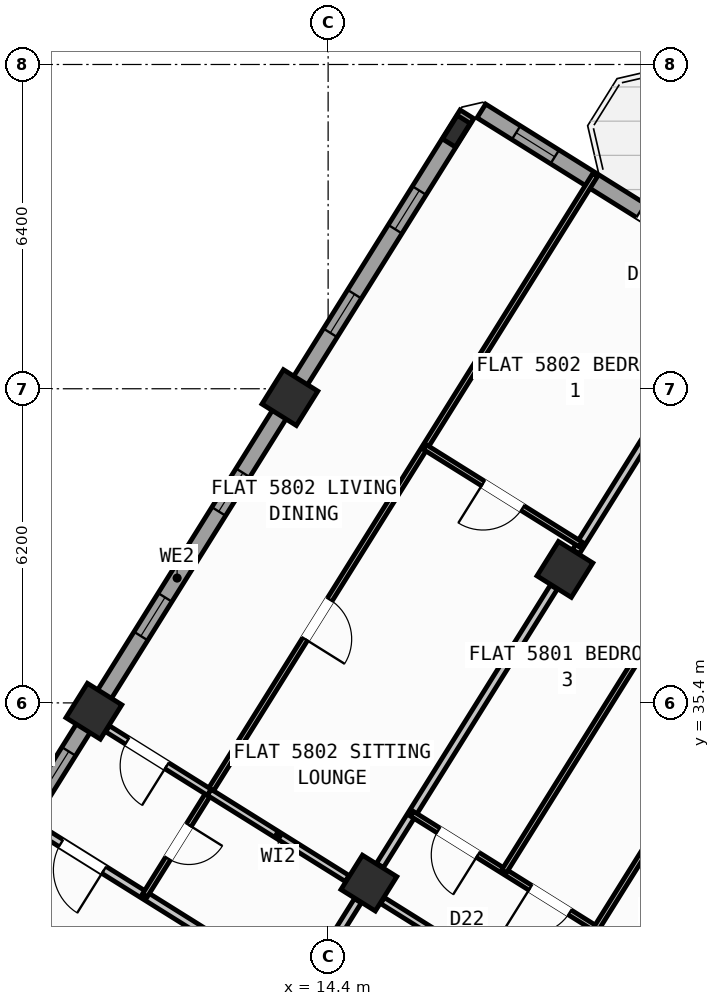
"""IFC4 building model, lengths in metres.
Left out: names, types, materials, properties, quantities, classifications, styles, units other than length and angle.
Written with IfcOpenShell. Run it as: python <this file> out.ifc"""

import sys

from ifc_helpers import new_model, si_unit, direction, frame, frame_2d, origin, origin_2d, place, context, subcontext, project, spatial, rectangle, hollow_rectangle, i_section, extrude, source, transform, mapped, element, fill, save


model = new_model("IFC4")
c1 = context("Model", 3, precision=1e-05, world=origin(), true_north=direction((0.0, 1.0)))
c2 = subcontext(c1, "Body", "Model", "MODEL_VIEW")
j1 = project(units=[si_unit("LENGTHUNIT", "METRE"), si_unit("PLANEANGLEUNIT", "RADIAN")], contexts=[c1])
p1 = place(None, origin())
s1 = spatial("IfcSite", under=j1, at=p1, CompositionType="ELEMENT")
p2 = place(p1, origin())
s2 = spatial("IfcBuilding", under=s1, at=p2, CompositionType="ELEMENT")
p3 = place(p2, frame((0.0, 0.0, 229.2)))
s3 = spatial("IfcBuildingStorey", under=s2, at=p3, CompositionType="ELEMENT", Elevation=229.2)
m1 = source(origin(), c2, "Body", "SweptSolid", [
    extrude(hollow_rectangle(XDim=0.8, YDim=0.8, WallThickness=0.032, at=origin_2d()), origin(), (0.0, 0.0, 1.0), 4.5),
])
for number, where, z_axis, x_axis in (
    (1, (19.073, 38.034, 0.0), (0.0, 0.0, 1.0), (-0.848, 0.53, 0.0)),
    (2, (15.205, 31.844, 0.0), (0.0, 0.0, 1.0), (-0.848, 0.53, 0.0)),
):
    element("IfcColumn", number, at=place(p3, frame(where, z_axis=z_axis, x_axis=x_axis)), inside=s3, PredefinedType="COLUMN", context=c2, shape_type="MappedRepresentation", body=[
        mapped(m1, transform((0.0, 0.0, 0.0), scale=1.0)),
    ])
m2 = source(origin(), c2, "Body", "SweptSolid", [
    extrude(i_section(OverallWidth=0.3, OverallDepth=0.55, WebThickness=0.015, FlangeThickness=0.029, at=origin_2d()), origin(), (0.0, 0.0, 1.0), 4.5),
])
p4 = place(p3, frame((16.931, 46.684, 0.0), z_axis=(0.0, 0.0, 1.0), x_axis=(-0.848048096156, 0.529919264233, 0.0)))
e3 = element("IfcColumn", 3, at=p4, inside=s3, PredefinedType="COLUMN", context=c2, shape_type="MappedRepresentation", body=[
    mapped(m2, transform((0.0, 0.0, 0.0), scale=1.0)),
])
for number, where, z_axis, x_axis in (
    (4, (13.646, 41.426, 0.0), (0.0, 0.0, 1.0), (-0.848, 0.53, 0.0)),
    (5, (9.777, 35.235, 0.0), (0.0, 0.0, 1.0), (-0.848, 0.53, 0.0)),
):
    element("IfcColumn", number, at=place(p3, frame(where, z_axis=z_axis, x_axis=x_axis)), inside=s3, PredefinedType="COLUMN", context=c2, shape_type="MappedRepresentation", body=[
        mapped(m1, transform((0.0, 0.0, 0.0), scale=1.0)),
    ])
p5 = place(p3, frame((5.7, 28.71, 0.0), z_axis=(0.0, 0.0, 1.0), x_axis=(0.529923711467, 0.8480453172, 0.0)))
e6 = element("IfcWall", 6, at=p5, inside=s3, PredefinedType="STANDARD", context=c2, shape_type="SweptSolid", body=[
    extrude(rectangle(XDim=21.587, YDim=0.32, at=frame_2d((10.794, 0.0))), origin(), (0.0, 0.0, 1.0), 2.395),
])
p6 = place(p5, frame((5.859, 0.0, 1.0)))
e7 = element("IfcOpeningElement", 7, at=p6, cuts=e6, PredefinedType="OPENING", context=c2, shape_type="SweptSolid", body=[
    extrude(rectangle(XDim=0.9, YDim=1.25, at=frame_2d((0.45, 0.625))), frame((0.0, 0.17, 0.0), z_axis=(0.0, -1.0, 0.0), x_axis=(1.0, 0.0, 0.0)), (0.0, 0.0, 1.0), 0.34),
])
p7 = place(p5, frame((9.444, 0.0, 1.0)))
e8 = element("IfcOpeningElement", 8, at=p7, cuts=e6, PredefinedType="OPENING", context=c2, shape_type="SweptSolid", body=[
    extrude(rectangle(XDim=0.9, YDim=1.25, at=frame_2d((0.45, 0.625))), frame((0.0, 0.17, 0.0), z_axis=(0.0, -1.0, 0.0), x_axis=(1.0, 0.0, 0.0)), (0.0, 0.0, 1.0), 0.34),
])
p8 = place(p5, frame((12.344, 0.0, 1.0)))
e9 = element("IfcOpeningElement", 9, at=p8, cuts=e6, PredefinedType="OPENING", context=c2, shape_type="SweptSolid", body=[
    extrude(rectangle(XDim=0.9, YDim=1.25, at=frame_2d((0.45, 0.625))), frame((0.0, 0.17, 0.0), z_axis=(0.0, -1.0, 0.0), x_axis=(1.0, 0.0, 0.0)), (0.0, 0.0, 1.0), 0.34),
])
p9 = place(p5, frame((16.5, 0.0, 1.0)))
e10 = element("IfcOpeningElement", 10, at=p9, cuts=e6, PredefinedType="OPENING", context=c2, shape_type="SweptSolid", body=[
    extrude(rectangle(XDim=0.9, YDim=1.25, at=frame_2d((0.45, 0.625))), frame((0.0, 0.17, 0.0), z_axis=(0.0, -1.0, 0.0), x_axis=(1.0, 0.0, 0.0)), (0.0, 0.0, 1.0), 0.34),
])
p10 = place(p5, frame((18.913, 0.0, 1.0)))
e11 = element("IfcOpeningElement", 11, at=p10, cuts=e6, PredefinedType="OPENING", context=c2, shape_type="SweptSolid", body=[
    extrude(rectangle(XDim=0.9, YDim=1.25, at=frame_2d((0.45, 0.625))), frame((0.0, 0.17, 0.0), z_axis=(0.0, -1.0, 0.0), x_axis=(1.0, 0.0, 0.0)), (0.0, 0.0, 1.0), 0.34),
])
p11 = place(p3, frame((17.424, 47.083, 0.0), z_axis=(0.0, 0.0, 1.0), x_axis=(0.848049927979, -0.529916332693, 0.0)))
e12 = element("IfcWall", 12, at=p11, inside=s3, PredefinedType="STANDARD", context=c2, shape_type="SweptSolid", body=[
    extrude(rectangle(XDim=29.223, YDim=0.32, at=frame_2d((14.612, 0.0))), origin(), (0.0, 0.0, 1.0), 4.22),
])
p12 = place(p11, frame((3.709, 0.0, 0.0)))
e13 = element("IfcOpeningElement", 13, at=p12, cuts=e12, PredefinedType="OPENING", context=c2, shape_type="SweptSolid", body=[
    extrude(rectangle(XDim=1.05, YDim=2.15, at=frame_2d((0.525, 1.075))), frame((0.0, 0.17, 0.0), z_axis=(0.0, -1.0, 0.0), x_axis=(1.0, 0.0, 0.0)), (0.0, 0.0, 1.0), 0.34),
])
p13 = place(p11, frame((0.809, 0.0, 1.0)))
e14 = element("IfcOpeningElement", 14, at=p13, cuts=e12, PredefinedType="OPENING", context=c2, shape_type="SweptSolid", body=[
    extrude(rectangle(XDim=0.9, YDim=1.25, at=frame_2d((0.45, 0.625))), frame((0.0, 0.17, 0.0), z_axis=(0.0, -1.0, 0.0), x_axis=(1.0, 0.0, 0.0)), (0.0, 0.0, 1.0), 0.34),
])
p14 = place(p11, frame((13.811, 0.0, 0.9)))
e15 = element("IfcOpeningElement", 15, at=p14, cuts=e12, PredefinedType="OPENING", context=c2, shape_type="SweptSolid", body=[
    extrude(rectangle(XDim=1.35, YDim=1.45, at=frame_2d((0.675, 0.725))), frame((0.0, 0.17, 0.0), z_axis=(0.0, -1.0, 0.0), x_axis=(1.0, 0.0, 0.0)), (0.0, 0.0, 1.0), 0.34),
])
p15 = place(p11, frame((17.254, 0.0, 1.0)))
e16 = element("IfcOpeningElement", 16, at=p15, cuts=e12, PredefinedType="OPENING", context=c2, shape_type="SweptSolid", body=[
    extrude(rectangle(XDim=0.9, YDim=1.25, at=frame_2d((0.45, 0.625))), frame((0.0, 0.17, 0.0), z_axis=(0.0, -1.0, 0.0), x_axis=(1.0, 0.0, 0.0)), (0.0, 0.0, 1.0), 0.34),
])
p16 = place(p11, frame((21.364, 0.0, 1.0)))
e17 = element("IfcOpeningElement", 17, at=p16, cuts=e12, PredefinedType="OPENING", context=c2, shape_type="SweptSolid", body=[
    extrude(rectangle(XDim=0.9, YDim=1.25, at=frame_2d((0.45, 0.625))), frame((0.0, 0.17, 0.0), z_axis=(0.0, -1.0, 0.0), x_axis=(1.0, 0.0, 0.0)), (0.0, 0.0, 1.0), 0.34),
])
p17 = place(p11, frame((26.003, 0.0, 1.0)))
e18 = element("IfcOpeningElement", 18, at=p17, cuts=e12, PredefinedType="OPENING", context=c2, shape_type="SweptSolid", body=[
    extrude(rectangle(XDim=0.9, YDim=1.25, at=frame_2d((0.45, 0.625))), frame((0.0, 0.17, 0.0), z_axis=(0.0, -1.0, 0.0), x_axis=(1.0, 0.0, 0.0)), (0.0, 0.0, 1.0), 0.34),
])
p18 = place(p11, frame((11.211, 0.0, 1.0)))
e19 = element("IfcOpeningElement", 19, at=p18, cuts=e12, PredefinedType="OPENING", context=c2, shape_type="SweptSolid", body=[
    extrude(rectangle(XDim=0.65, YDim=1.15, at=frame_2d((0.325, 0.575))), frame((0.0, 0.17, 0.0), z_axis=(0.0, -1.0, 0.0), x_axis=(1.0, 0.0, 0.0)), (0.0, 0.0, 1.0), 0.34),
])
p19 = place(p11, frame((9.079, 0.0, 1.0)))
e20 = element("IfcOpeningElement", 20, at=p19, cuts=e12, PredefinedType="OPENING", context=c2, shape_type="SweptSolid", body=[
    extrude(rectangle(XDim=0.65, YDim=1.15, at=frame_2d((0.325, 0.575))), frame((0.0, 0.17, 0.0), z_axis=(0.0, -1.0, 0.0), x_axis=(1.0, 0.0, 0.0)), (0.0, 0.0, 1.0), 0.34),
])
p20 = place(p11, frame((6.951, 0.0, 1.0)))
e21 = element("IfcOpeningElement", 21, at=p20, cuts=e12, PredefinedType="OPENING", context=c2, shape_type="SweptSolid", body=[
    extrude(rectangle(XDim=0.65, YDim=1.15, at=frame_2d((0.325, 0.575))), frame((0.0, 0.17, 0.0), z_axis=(0.0, -1.0, 0.0), x_axis=(1.0, 0.0, 0.0)), (0.0, 0.0, 1.0), 0.34),
])
p21 = place(p3, frame((22.495, 24.281, 0.0), z_axis=(0.0, 0.0, 1.0), x_axis=(-0.848052408131, 0.529912363569, 0.0)))
e22 = element("IfcWall", 22, at=p21, inside=s3, PredefinedType="PARTITIONING", context=c2, shape_type="SweptSolid", body=[
    extrude(rectangle(XDim=16.73, YDim=0.16, at=frame_2d((8.365, 0.0))), origin(), (0.0, 0.0, 1.0), 4.21),
])
p22 = place(p21, frame((1.385, 0.0, 0.0)))
e23 = element("IfcOpeningElement", 23, at=p22, cuts=e22, PredefinedType="OPENING", context=c2, shape_type="SweptSolid", body=[
    extrude(rectangle(XDim=1.0, YDim=2.1, at=frame_2d((0.5, 1.05))), frame((0.0, 0.09, 0.0), z_axis=(0.0, -1.0, 0.0), x_axis=(1.0, 0.0, 0.0)), (0.0, 0.0, 1.0), 0.18),
])
p23 = place(p21, frame((14.76, 0.0, 0.0)))
e24 = element("IfcOpeningElement", 24, at=p23, cuts=e22, PredefinedType="OPENING", context=c2, shape_type="SweptSolid", body=[
    extrude(rectangle(XDim=1.0, YDim=2.1, at=frame_2d((0.5, 1.05))), frame((0.0, 0.09, 0.0), z_axis=(0.0, -1.0, 0.0), x_axis=(1.0, 0.0, 0.0)), (0.0, 0.0, 1.0), 0.18),
])
p24 = place(p3, frame((21.329, 22.416, 0.0), z_axis=(0.0, 0.0, 1.0), x_axis=(-0.848052408131, 0.529912363569, 0.0)))
e25 = element("IfcWall", 25, at=p24, inside=s3, PredefinedType="PARTITIONING", context=c2, shape_type="SweptSolid", body=[
    extrude(rectangle(XDim=16.73, YDim=0.16, at=frame_2d((8.365, 0.0))), origin(), (0.0, 0.0, 1.0), 4.21),
])
p25 = place(p24, frame((1.505, 0.0, 0.0)))
e26 = element("IfcOpeningElement", 26, at=p25, cuts=e25, PredefinedType="OPENING", context=c2, shape_type="SweptSolid", body=[
    extrude(rectangle(XDim=1.0, YDim=2.1, at=frame_2d((0.5, 1.05))), frame((0.0, 0.09, 0.0), z_axis=(0.0, -1.0, 0.0), x_axis=(1.0, 0.0, 0.0)), (0.0, 0.0, 1.0), 0.18),
])
p26 = place(p24, frame((6.435, 0.0, 0.0)))
e27 = element("IfcOpeningElement", 27, at=p26, cuts=e25, PredefinedType="OPENING", context=c2, shape_type="SweptSolid", body=[
    extrude(rectangle(XDim=1.0, YDim=2.1, at=frame_2d((0.5, 1.05))), frame((0.0, 0.09, 0.0), z_axis=(0.0, -1.0, 0.0), x_axis=(1.0, 0.0, 0.0)), (0.0, 0.0, 1.0), 0.18),
])
p27 = place(p24, frame((12.784, 0.0, 0.0)))
e28 = element("IfcOpeningElement", 28, at=p27, cuts=e25, PredefinedType="OPENING", context=c2, shape_type="SweptSolid", body=[
    extrude(rectangle(XDim=1.0, YDim=2.1, at=frame_2d((0.5, 1.05))), frame((0.0, 0.09, 0.0), z_axis=(0.0, -1.0, 0.0), x_axis=(1.0, 0.0, 0.0)), (0.0, 0.0, 1.0), 0.18),
])
p28 = place(p3, frame((22.206, 43.049, 0.0), z_axis=(0.0, 0.0, 1.0), x_axis=(-0.529919150083, -0.848048167486, 0.0)))
e29 = element("IfcWall", 29, at=p28, inside=s3, PredefinedType="PARTITIONING", context=c2, shape_type="SweptSolid", body=[
    extrude(rectangle(XDim=5.501, YDim=0.16, at=frame_2d((2.75, 0.0))), origin(), (0.0, 0.0, 1.0), 4.21),
])
p29 = place(p3, frame((18.854, 37.685, 0.0), z_axis=(0.0, 0.0, 1.0), x_axis=(-0.529907440938, -0.848055484057, 0.0)))
e30 = element("IfcWall", 30, at=p29, inside=s3, PredefinedType="PARTITIONING", context=c2, shape_type="SweptSolid", body=[
    extrude(rectangle(XDim=6.476, YDim=0.16, at=frame_2d((3.238, 0.0))), origin(), (0.0, 0.0, 1.0), 2.395),
])
p30 = place(p3, frame((14.986, 31.494, 0.0), z_axis=(0.0, 0.0, 1.0), x_axis=(-0.52989628283, -0.848062456098, 0.0)))
e31 = element("IfcWall", 31, at=p30, inside=s3, PredefinedType="PARTITIONING", context=c2, shape_type="SweptSolid", body=[
    extrude(rectangle(XDim=2.138, YDim=0.16, at=frame_2d((1.069, 0.0))), origin(), (0.0, 0.0, 1.0), 2.395),
])
p31 = place(p3, frame((20.203, 28.543, 0.0), z_axis=(0.0, 0.0, 1.0), x_axis=(-0.848049955116, 0.529916289265, 0.0)))
e32 = element("IfcWall", 32, at=p31, inside=s3, PredefinedType="PLUMBINGWALL", context=c2, shape_type="SweptSolid", body=[
    extrude(rectangle(XDim=5.576, YDim=0.14, at=frame_2d((2.788, 0.0))), origin(), (0.0, 0.0, 1.0), 3.745),
])
p32 = place(p31, frame((2.338, 0.0, 0.0)))
e33 = element("IfcOpeningElement", 33, at=p32, cuts=e32, PredefinedType="OPENING", context=c2, shape_type="SweptSolid", body=[
    extrude(rectangle(XDim=0.78, YDim=2.05, at=frame_2d((0.39, 1.025))), frame((0.0, 0.08, 0.0), z_axis=(0.0, -1.0, 0.0), x_axis=(1.0, 0.0, 0.0)), (0.0, 0.0, 1.0), 0.16),
])
p33 = place(p3, frame((21.502, 29.807, 0.0), z_axis=(0.0, 0.0, 1.0), x_axis=(-0.848051709137, 0.529913482212, 0.0)))
e34 = element("IfcWall", 34, at=p33, inside=s3, PredefinedType="PARTITIONING", context=c2, shape_type="SweptSolid", body=[
    extrude(rectangle(XDim=6.42, YDim=0.11, at=frame_2d((3.21, 0.0))), origin(), (0.0, 0.0, 1.0), 4.21),
])
p34 = place(p33, frame((0.61, 0.0, 0.0)))
e35 = element("IfcOpeningElement", 35, at=p34, cuts=e34, PredefinedType="OPENING", context=c2, shape_type="SweptSolid", body=[
    extrude(rectangle(XDim=0.92, YDim=2.08, at=frame_2d((0.46, 1.04))), frame((0.0, 0.065, 0.0), z_axis=(0.0, -1.0, 0.0), x_axis=(1.0, 0.0, 0.0)), (0.0, 0.0, 1.0), 0.13),
])
p35 = place(p33, frame((2.75, 0.0, 0.0)))
e36 = element("IfcOpeningElement", 36, at=p35, cuts=e34, PredefinedType="OPENING", context=c2, shape_type="SweptSolid", body=[
    extrude(rectangle(XDim=0.92, YDim=2.08, at=frame_2d((0.46, 1.04))), frame((0.0, 0.065, 0.0), z_axis=(0.0, -1.0, 0.0), x_axis=(1.0, 0.0, 0.0)), (0.0, 0.0, 1.0), 0.13),
])
p36 = place(p33, frame((4.89, 0.0, 0.0)))
e37 = element("IfcOpeningElement", 37, at=p36, cuts=e34, PredefinedType="OPENING", context=c2, shape_type="SweptSolid", body=[
    extrude(rectangle(XDim=0.92, YDim=2.08, at=frame_2d((0.46, 1.04))), frame((0.0, 0.065, 0.0), z_axis=(0.0, -1.0, 0.0), x_axis=(1.0, 0.0, 0.0)), (0.0, 0.0, 1.0), 0.13),
])
p37 = place(p3, frame((26.37, 41.635, 0.0), z_axis=(0.0, 0.0, 1.0), x_axis=(-0.529925845384, -0.848043983761, 0.0)))
e38 = element("IfcWall", 38, at=p37, inside=s3, PredefinedType="PARTITIONING", context=c2, shape_type="SweptSolid", body=[
    extrude(rectangle(XDim=12.61, YDim=0.11, at=frame_2d((6.305, 0.0))), origin(), (0.0, 0.0, 1.0), 3.895),
])
p38 = place(p3, frame((24.555, 42.769, 0.0), z_axis=(0.0, 0.0, 1.0), x_axis=(-0.529911921261, -0.848052684511, 0.0)))
e39 = element("IfcWall", 39, at=p38, inside=s3, PredefinedType="PARTITIONING", context=c2, shape_type="SweptSolid", body=[
    extrude(rectangle(XDim=12.61, YDim=0.11, at=frame_2d((6.305, 0.0))), origin(), (0.0, 0.0, 1.0), 3.895),
])
p39 = place(p3, frame((19.67, 45.821, 0.0), z_axis=(0.0, 0.0, 1.0), x_axis=(-0.529920421309, -0.848047373134, 0.0)))
e40 = element("IfcWall", 40, at=p39, inside=s3, PredefinedType="PARTITIONING", context=c2, shape_type="SweptSolid", body=[
    extrude(rectangle(XDim=16.77, YDim=0.11, at=frame_2d((8.385, 0.0))), origin(), (0.0, 0.0, 1.0), 4.21),
])
p40 = place(p39, frame((15.13, 0.0, 0.0)))
e41 = element("IfcOpeningElement", 41, at=p40, cuts=e40, PredefinedType="OPENING", context=c2, shape_type="SweptSolid", body=[
    extrude(rectangle(XDim=0.78, YDim=2.05, at=frame_2d((0.39, 1.025))), frame((0.0, 0.065, 0.0), z_axis=(0.0, -1.0, 0.0), x_axis=(1.0, 0.0, 0.0)), (0.0, 0.0, 1.0), 0.13),
])
p41 = place(p39, frame((9.884, 0.0, 0.0)))
e42 = element("IfcOpeningElement", 42, at=p41, cuts=e40, PredefinedType="OPENING", context=c2, shape_type="SweptSolid", body=[
    extrude(rectangle(XDim=0.92, YDim=2.08, at=frame_2d((0.46, 1.04))), frame((0.0, 0.065, 0.0), z_axis=(0.0, -1.0, 0.0), x_axis=(1.0, 0.0, 0.0)), (0.0, 0.0, 1.0), 0.13),
])
p42 = place(p3, frame((12.055, 33.635, 0.0), z_axis=(0.0, 0.0, 1.0), x_axis=(-0.848102546264, 0.529832115883, 0.0)))
e43 = element("IfcWall", 43, at=p42, inside=s3, PredefinedType="PLUMBINGWALL", context=c2, shape_type="SweptSolid", body=[
    extrude(rectangle(XDim=2.368, YDim=0.14, at=frame_2d((1.184, 0.0))), origin(), (0.0, 0.0, 1.0), 3.745),
])
p43 = place(p42, frame((0.99, 0.0, 0.0)))
e44 = element("IfcOpeningElement", 44, at=p43, cuts=e43, PredefinedType="OPENING", context=c2, shape_type="SweptSolid", body=[
    extrude(rectangle(XDim=0.92, YDim=2.08, at=frame_2d((0.46, 1.04))), frame((0.0, 0.08, 0.0), z_axis=(0.0, -1.0, 0.0), x_axis=(1.0, 0.0, 0.0)), (0.0, 0.0, 1.0), 0.16),
])
p44 = place(p3, frame((14.776, 31.935, 0.0), z_axis=(0.0, 0.0, 1.0), x_axis=(-0.848011130036, 0.529978417802, 0.0)))
e45 = element("IfcWall", 45, at=p44, inside=s3, PredefinedType="PLUMBINGWALL", context=c2, shape_type="SweptSolid", body=[
    extrude(rectangle(XDim=3.208, YDim=0.14, at=frame_2d((1.604, 0.0))), origin(), (0.0, 0.0, 1.0), 3.745),
])
p45 = place(p3, frame((19.382, 38.529, 0.0), z_axis=(0.0, 0.0, 1.0), x_axis=(-0.848051346257, 0.52991406295, 0.0)))
e46 = element("IfcWall", 46, at=p45, inside=s3, PredefinedType="PARTITIONING", context=c2, shape_type="SweptSolid", body=[
    extrude(rectangle(XDim=3.62, YDim=0.11, at=frame_2d((1.81, 0.0))), origin(), (0.0, 0.0, 1.0), 4.21),
])
p46 = place(p45, frame((1.35, 0.0, 0.0)))
e47 = element("IfcOpeningElement", 47, at=p46, cuts=e46, PredefinedType="OPENING", context=c2, shape_type="SweptSolid", body=[
    extrude(rectangle(XDim=0.92, YDim=2.08, at=frame_2d((0.46, 1.04))), frame((0.0, 0.065, 0.0), z_axis=(0.0, -1.0, 0.0), x_axis=(1.0, 0.0, 0.0)), (0.0, 0.0, 1.0), 0.13),
])
m3 = source(origin(), c2, "Body", "SweptSolid", [
    extrude(rectangle(XDim=1.05, YDim=2.15, at=frame_2d((0.525, 1.075))), frame((0.0, 0.025, 0.0), z_axis=(0.0, -1.0, 0.0), x_axis=(1.0, 0.0, 0.0)), (0.0, 0.0, 1.0), 0.05),
])
p47 = place(p12, origin())
e48 = element("IfcDoor", 48, at=p47, inside=s3, OperationType="SINGLE_SWING_RIGHT", PredefinedType="DOOR", context=c2, shape_type="MappedRepresentation", body=[
    mapped(m3, transform((0.0, 0.0, 0.0), scale=1.0)),
])
fill(e13, e48)
m4 = source(origin(), c2, "Body", "SweptSolid", [
    extrude(rectangle(XDim=0.9, YDim=1.25, at=frame_2d((0.45, 0.625))), frame((0.0, 0.03, 0.0), z_axis=(0.0, -1.0, 0.0), x_axis=(1.0, 0.0, 0.0)), (0.0, 0.0, 1.0), 0.06),
])
p48 = place(p6, origin())
e49 = element("IfcWindow", 49, at=p48, inside=s3, PartitioningType="SINGLE_PANEL", PredefinedType="WINDOW", context=c2, shape_type="MappedRepresentation", body=[
    mapped(m4, transform((0.0, 0.0, 0.0), scale=1.0)),
])
fill(e7, e49)
p49 = place(p7, origin())
e50 = element("IfcWindow", 50, at=p49, inside=s3, PartitioningType="SINGLE_PANEL", PredefinedType="WINDOW", context=c2, shape_type="MappedRepresentation", body=[
    mapped(m4, transform((0.0, 0.0, 0.0), scale=1.0)),
])
fill(e8, e50)
p50 = place(p8, origin())
e51 = element("IfcWindow", 51, at=p50, inside=s3, PartitioningType="SINGLE_PANEL", PredefinedType="WINDOW", context=c2, shape_type="MappedRepresentation", body=[
    mapped(m4, transform((0.0, 0.0, 0.0), scale=1.0)),
])
fill(e9, e51)
p51 = place(p9, origin())
e52 = element("IfcWindow", 52, at=p51, inside=s3, PartitioningType="SINGLE_PANEL", PredefinedType="WINDOW", context=c2, shape_type="MappedRepresentation", body=[
    mapped(m4, transform((0.0, 0.0, 0.0), scale=1.0)),
])
fill(e10, e52)
p52 = place(p10, origin())
e53 = element("IfcWindow", 53, at=p52, inside=s3, PartitioningType="SINGLE_PANEL", PredefinedType="WINDOW", context=c2, shape_type="MappedRepresentation", body=[
    mapped(m4, transform((0.0, 0.0, 0.0), scale=1.0)),
])
fill(e11, e53)
p53 = place(p13, origin())
e54 = element("IfcWindow", 54, at=p53, inside=s3, PartitioningType="SINGLE_PANEL", PredefinedType="WINDOW", context=c2, shape_type="MappedRepresentation", body=[
    mapped(m4, transform((0.0, 0.0, 0.0), scale=1.0)),
])
fill(e14, e54)
m5 = source(origin(), c2, "Body", "SweptSolid", [
    extrude(rectangle(XDim=0.92, YDim=2.08, at=frame_2d((0.46, 1.04))), frame((0.0, 0.025, 0.0), z_axis=(0.0, -1.0, 0.0), x_axis=(1.0, 0.0, 0.0)), (0.0, 0.0, 1.0), 0.05),
])
p54 = place(p35, origin())
e55 = element("IfcDoor", 55, at=p54, inside=s3, OperationType="SINGLE_SWING_RIGHT", PredefinedType="DOOR", context=c2, shape_type="MappedRepresentation", body=[
    mapped(m5, transform((0.0, 0.0, 0.0), scale=1.0)),
])
fill(e36, e55)
p55 = place(p36, origin())
e56 = element("IfcDoor", 56, at=p55, inside=s3, OperationType="SINGLE_SWING_LEFT", PredefinedType="DOOR", context=c2, shape_type="MappedRepresentation", body=[
    mapped(m5, transform((0.0, 0.0, 0.0), scale=1.0)),
])
fill(e37, e56)
m6 = source(origin(), c2, "Body", "SweptSolid", [
    extrude(rectangle(XDim=1.0, YDim=2.1, at=frame_2d((0.5, 1.05))), frame((0.0, 0.025, 0.0), z_axis=(0.0, -1.0, 0.0), x_axis=(1.0, 0.0, 0.0)), (0.0, 0.0, 1.0), 0.05),
])
p56 = place(p23, origin())
e57 = element("IfcDoor", 57, at=p56, inside=s3, OperationType="SINGLE_SWING_LEFT", PredefinedType="DOOR", context=c2, shape_type="MappedRepresentation", body=[
    mapped(m6, transform((0.0, 0.0, 0.0), scale=1.0)),
])
fill(e24, e57)
p57 = place(p43, origin())
e58 = element("IfcDoor", 58, at=p57, inside=s3, OperationType="SINGLE_SWING_LEFT", PredefinedType="DOOR", context=c2, shape_type="MappedRepresentation", body=[
    mapped(m5, transform((0.0, 0.0, 0.0), scale=1.0)),
])
fill(e44, e58)
m7 = source(origin(), c2, "Body", "SweptSolid", [
    extrude(rectangle(XDim=0.78, YDim=2.05, at=frame_2d((0.39, 1.025))), frame((0.0, 0.025, 0.0), z_axis=(0.0, -1.0, 0.0), x_axis=(1.0, 0.0, 0.0)), (0.0, 0.0, 1.0), 0.05),
])
p58 = place(p40, origin())
e59 = element("IfcDoor", 59, at=p58, inside=s3, OperationType="SINGLE_SWING_LEFT", PredefinedType="DOOR", context=c2, shape_type="MappedRepresentation", body=[
    mapped(m7, transform((0.0, 0.0, 0.0), scale=1.0)),
])
fill(e41, e59)
p59 = place(p41, origin())
e60 = element("IfcDoor", 60, at=p59, inside=s3, OperationType="SINGLE_SWING_RIGHT", PredefinedType="DOOR", context=c2, shape_type="MappedRepresentation", body=[
    mapped(m5, transform((0.0, 0.0, 0.0), scale=1.0)),
])
fill(e42, e60)
p60 = place(p46, origin())
e61 = element("IfcDoor", 61, at=p60, inside=s3, OperationType="SINGLE_SWING_RIGHT", PredefinedType="DOOR", context=c2, shape_type="MappedRepresentation", body=[
    mapped(m5, transform((0.0, 0.0, 0.0), scale=1.0)),
])
fill(e47, e61)
save(model, sys.argv[1])
